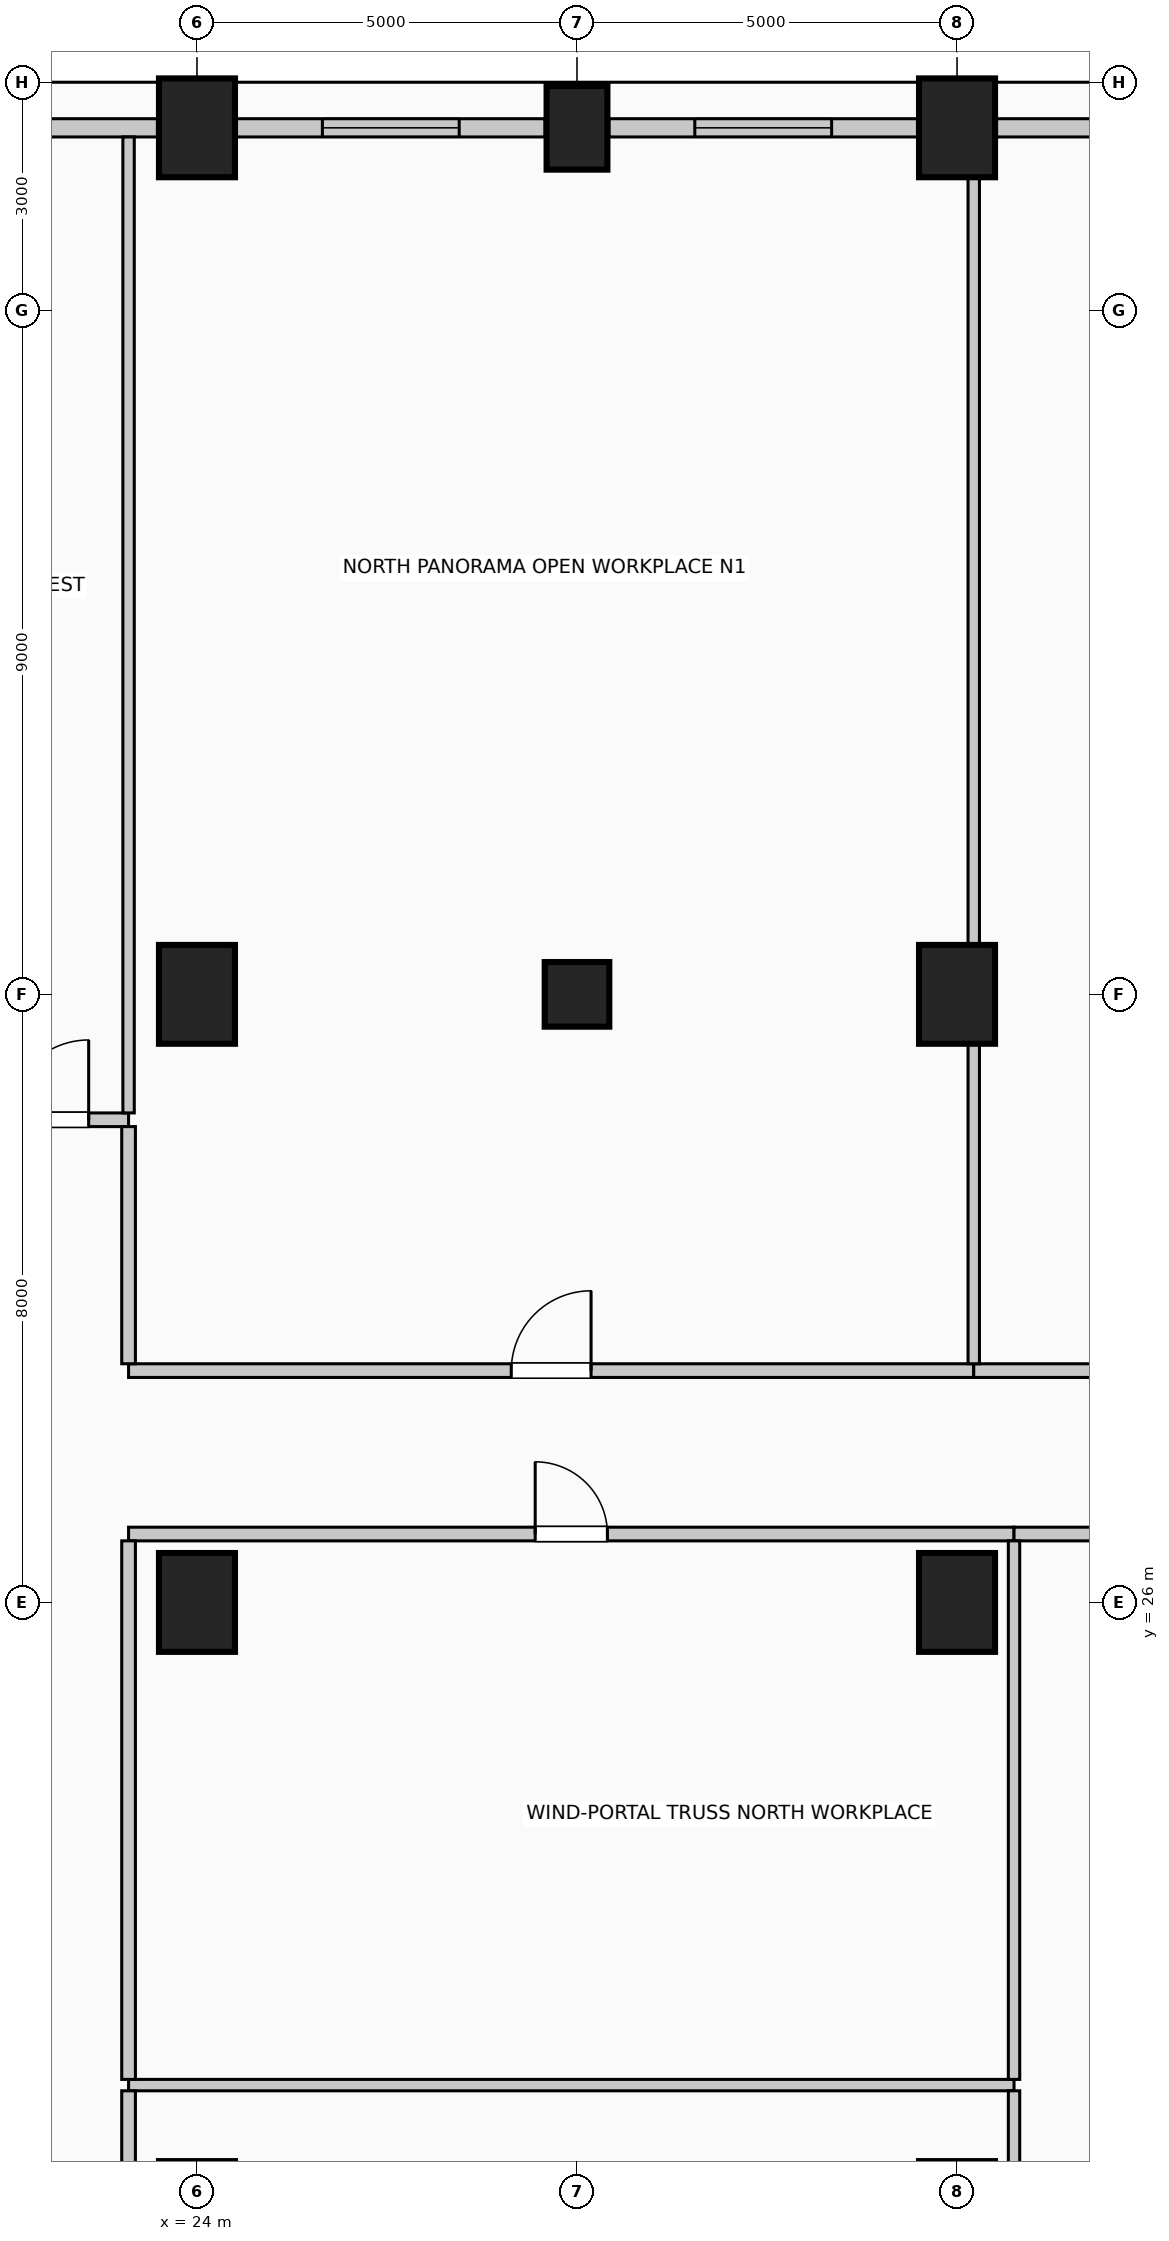
"""IFC4 building model, lengths in metres.
Left out: names, types, materials, properties, quantities, classifications, styles, units other than length and angle.
Written with IfcOpenShell. Run it as: python <this file> out.ifc"""

import sys

from ifc_helpers import new_model, si_unit, direction, frame, frame_2d, origin, origin_2d, place, context, subcontext, project, spatial, rectangle, circle, extrude, element, fill, save


model = new_model("IFC4")
c1 = context("Model", 3, precision=1e-05, world=origin(), true_north=direction((0.0, 1.0)))
c2 = subcontext(c1, "Body", "Model", "MODEL_VIEW")
j1 = project(units=[si_unit("LENGTHUNIT", "METRE"), si_unit("PLANEANGLEUNIT", "RADIAN")], contexts=[c1])
p1 = place(None, origin())
s1 = spatial("IfcSite", under=j1, at=p1, CompositionType="ELEMENT")
p2 = place(p1, origin())
s2 = spatial("IfcBuilding", under=s1, at=p2, CompositionType="ELEMENT")
p3 = place(p2, frame((0.0, 0.0, 206.6)))
s3 = spatial("IfcBuildingStorey", under=s2, at=p3, CompositionType="ELEMENT", Elevation=206.6)
p4 = place(p3, frame((24.0, 45.4, 0.0), z_axis=(0.0, 0.0, 1.0), x_axis=(1.0, 0.0, 0.0)))
e1 = element("IfcColumn", 1, at=p4, inside=s3, PredefinedType="COLUMN", context=c2, shape_type="SweptSolid", body=[
    extrude(rectangle(XDim=1.0, YDim=1.3, at=origin_2d()), origin(), (0.0, 0.0, 1.0), 4.0),
])
p5 = place(p3, frame((29.0, 45.4, 0.0), z_axis=(0.0, 0.0, 1.0), x_axis=(1.0, 0.0, 0.0)))
e2 = element("IfcColumn", 2, at=p5, inside=s3, PredefinedType="COLUMN", context=c2, shape_type="SweptSolid", body=[
    extrude(rectangle(XDim=0.8, YDim=1.1, at=origin_2d()), origin(), (0.0, 0.0, 1.0), 4.0),
])
for number, where, z_axis, x_axis in (
    (3, (34.0, 45.4, 0.0), (0.0, 0.0, 1.0), (1.0, 0.0, 0.0)),
    (4, (24.0, 18.0, 0.0), (0.0, 0.0, 1.0), (1.0, 0.0, 0.0)),
    (5, (34.0, 18.0, 0.0), (0.0, 0.0, 1.0), (1.0, 0.0, 0.0)),
    (6, (24.0, 26.0, 0.0), (0.0, 0.0, 1.0), (1.0, 0.0, 0.0)),
    (7, (34.0, 26.0, 0.0), (0.0, 0.0, 1.0), (1.0, 0.0, 0.0)),
    (8, (24.0, 34.0, 0.0), (0.0, 0.0, 1.0), (1.0, 0.0, 0.0)),
    (9, (34.0, 34.0, 0.0), (0.0, 0.0, 1.0), (1.0, 0.0, 0.0)),
):
    element("IfcColumn", number, at=place(p3, frame(where, z_axis=z_axis, x_axis=x_axis)), inside=s3, PredefinedType="COLUMN", context=c2, shape_type="SweptSolid", body=[
        extrude(rectangle(XDim=1.0, YDim=1.3, at=origin_2d()), origin(), (0.0, 0.0, 1.0), 4.0),
    ])
p6 = place(p3, frame((29.0, 34.0, 0.0), z_axis=(0.0, 0.0, 1.0), x_axis=(1.0, 0.0, 0.0)))
e10 = element("IfcColumn", 10, at=p6, inside=s3, PredefinedType="COLUMN", context=c2, shape_type="SweptSolid", body=[
    extrude(circle(Radius=0.425, at=origin_2d()), origin(), (0.0, 0.0, 1.0), 4.0),
])
p7 = place(p3, frame((16.92, 45.4, 0.0), z_axis=(0.0, 0.0, 1.0), x_axis=(1.0, 0.0, 0.0)))
e11 = element("IfcWall", 11, at=p7, inside=s3, PredefinedType="SOLIDWALL", context=c2, shape_type="SweptSolid", body=[
    extrude(rectangle(XDim=6.56, YDim=0.24, at=frame_2d((3.28, 0.0))), origin(), (0.0, 0.0, 1.0), 3.0),
])
p8 = place(p7, frame((0.987, 0.0, 0.42)))
e12 = element("IfcOpeningElement", 12, at=p8, cuts=e11, PredefinedType="OPENING", context=c2, shape_type="SweptSolid", body=[
    extrude(rectangle(XDim=1.8, YDim=2.2, at=frame_2d((0.9, 1.1))), frame((0.0, 0.13, 0.0), z_axis=(0.0, -1.0, 0.0), x_axis=(1.0, 0.0, 0.0)), (0.0, 0.0, 1.0), 0.26),
])
p9 = place(p3, frame((24.52, 45.4, 0.0), z_axis=(0.0, 0.0, 1.0), x_axis=(1.0, 0.0, 0.0)))
e13 = element("IfcWall", 13, at=p9, inside=s3, PredefinedType="SOLIDWALL", context=c2, shape_type="SweptSolid", body=[
    extrude(rectangle(XDim=4.06, YDim=0.24, at=frame_2d((2.03, 0.0))), origin(), (0.0, 0.0, 1.0), 3.0),
])
p10 = place(p9, frame((1.13, 0.0, 0.42)))
e14 = element("IfcOpeningElement", 14, at=p10, cuts=e13, PredefinedType="OPENING", context=c2, shape_type="SweptSolid", body=[
    extrude(rectangle(XDim=1.8, YDim=2.2, at=frame_2d((0.9, 1.1))), frame((0.0, 0.13, 0.0), z_axis=(0.0, -1.0, 0.0), x_axis=(1.0, 0.0, 0.0)), (0.0, 0.0, 1.0), 0.26),
])
p11 = place(p3, frame((29.42, 45.4, 0.0), z_axis=(0.0, 0.0, 1.0), x_axis=(1.0, 0.0, 0.0)))
e15 = element("IfcWall", 15, at=p11, inside=s3, PredefinedType="SOLIDWALL", context=c2, shape_type="SweptSolid", body=[
    extrude(rectangle(XDim=4.06, YDim=0.24, at=frame_2d((2.03, 0.0))), origin(), (0.0, 0.0, 1.0), 3.0),
])
p12 = place(p11, frame((1.13, 0.0, 0.42)))
e16 = element("IfcOpeningElement", 16, at=p12, cuts=e15, PredefinedType="OPENING", context=c2, shape_type="SweptSolid", body=[
    extrude(rectangle(XDim=1.8, YDim=2.2, at=frame_2d((0.9, 1.1))), frame((0.0, 0.13, 0.0), z_axis=(0.0, -1.0, 0.0), x_axis=(1.0, 0.0, 0.0)), (0.0, 0.0, 1.0), 0.26),
])
p13 = place(p3, frame((34.52, 45.4, 0.0), z_axis=(0.0, 0.0, 1.0), x_axis=(1.0, 0.0, 0.0)))
e17 = element("IfcWall", 17, at=p13, inside=s3, PredefinedType="SOLIDWALL", context=c2, shape_type="SweptSolid", body=[
    extrude(rectangle(XDim=6.56, YDim=0.24, at=frame_2d((3.28, 0.0))), origin(), (0.0, 0.0, 1.0), 3.0),
])
p14 = place(p13, frame((3.773, 0.0, 0.42)))
e18 = element("IfcOpeningElement", 18, at=p14, cuts=e17, PredefinedType="OPENING", context=c2, shape_type="SweptSolid", body=[
    extrude(rectangle(XDim=1.8, YDim=2.2, at=frame_2d((0.9, 1.1))), frame((0.0, 0.13, 0.0), z_axis=(0.0, -1.0, 0.0), x_axis=(1.0, 0.0, 0.0)), (0.0, 0.0, 1.0), 0.26),
])
p15 = place(p3, frame((23.1, 19.65, 0.0), z_axis=(0.0, 0.0, 1.0), x_axis=(1.0, 0.0, 0.0)))
e19 = element("IfcWall", 19, at=p15, inside=s3, PredefinedType="PARTITIONING", context=c2, shape_type="SweptSolid", body=[
    extrude(rectangle(XDim=11.65, YDim=0.15, at=frame_2d((5.825, 0.0))), origin(), (0.0, 0.0, 1.0), 3.75),
])
p16 = place(p3, frame((23.1, 26.9, 0.0), z_axis=(0.0, 0.0, 1.0), x_axis=(1.0, 0.0, 0.0)))
e20 = element("IfcWall", 20, at=p16, inside=s3, PredefinedType="PARTITIONING", context=c2, shape_type="SweptSolid", body=[
    extrude(rectangle(XDim=11.65, YDim=0.18, at=frame_2d((5.825, 0.0))), origin(), (0.0, 0.0, 1.0), 3.75),
])
p17 = place(p16, frame((5.35, 0.0, 0.0)))
e21 = element("IfcOpeningElement", 21, at=p17, cuts=e20, PredefinedType="OPENING", context=c2, shape_type="SweptSolid", body=[
    extrude(rectangle(XDim=0.95, YDim=2.15, at=frame_2d((0.475, 1.075))), frame((0.0, 0.1, 0.0), z_axis=(0.0, -1.0, 0.0), x_axis=(1.0, 0.0, 0.0)), (0.0, 0.0, 1.0), 0.2),
])
p18 = place(p3, frame((34.75, 26.9, 0.0), z_axis=(0.0, 0.0, 1.0), x_axis=(1.0, 0.0, 0.0)))
e22 = element("IfcWall", 22, at=p18, inside=s3, PredefinedType="PARTITIONING", context=c2, shape_type="SweptSolid", body=[
    extrude(rectangle(XDim=22.53, YDim=0.18, at=frame_2d((11.265, 0.0))), origin(), (0.0, 0.0, 1.0), 3.75),
])
p19 = place(p3, frame((23.1, 29.05, 0.0), z_axis=(0.0, 0.0, 1.0), x_axis=(1.0, 0.0, 0.0)))
e23 = element("IfcWall", 23, at=p19, inside=s3, PredefinedType="PARTITIONING", context=c2, shape_type="SweptSolid", body=[
    extrude(rectangle(XDim=11.12, YDim=0.18, at=frame_2d((5.56, 0.0))), origin(), (0.0, 0.0, 1.0), 3.75),
])
p20 = place(p19, frame((5.035, 0.0, 0.0)))
e24 = element("IfcOpeningElement", 24, at=p20, cuts=e23, PredefinedType="OPENING", context=c2, shape_type="SweptSolid", body=[
    extrude(rectangle(XDim=1.05, YDim=2.15, at=frame_2d((0.525, 1.075))), frame((0.0, 0.1, 0.0), z_axis=(0.0, -1.0, 0.0), x_axis=(1.0, 0.0, 0.0)), (0.0, 0.0, 1.0), 0.2),
])
p21 = place(p3, frame((34.22, 29.05, 0.0), z_axis=(0.0, 0.0, 1.0), x_axis=(1.0, 0.0, 0.0)))
e25 = element("IfcWall", 25, at=p21, inside=s3, PredefinedType="PARTITIONING", context=c2, shape_type="SweptSolid", body=[
    extrude(rectangle(XDim=7.33, YDim=0.18, at=frame_2d((3.665, 0.0))), origin(), (0.0, 0.0, 1.0), 3.75),
])
p22 = place(p21, frame((3.19, 0.0, 0.0)))
e26 = element("IfcOpeningElement", 26, at=p22, cuts=e25, PredefinedType="OPENING", context=c2, shape_type="SweptSolid", body=[
    extrude(rectangle(XDim=0.95, YDim=2.15, at=frame_2d((0.475, 1.075))), frame((0.0, 0.1, 0.0), z_axis=(0.0, -1.0, 0.0), x_axis=(1.0, 0.0, 0.0)), (0.0, 0.0, 1.0), 0.2),
])
p23 = place(p3, frame((21.0, 32.35, 0.0), z_axis=(0.0, 0.0, 1.0), x_axis=(1.0, 0.0, 0.0)))
e27 = element("IfcWall", 27, at=p23, inside=s3, PredefinedType="PARTITIONING", context=c2, shape_type="SweptSolid", body=[
    extrude(rectangle(XDim=2.1, YDim=0.18, at=frame_2d((1.05, 0.0))), origin(), (0.0, 0.0, 1.0), 3.75),
])
p24 = place(p23, frame((0.525, 0.0, 0.0)))
e28 = element("IfcOpeningElement", 28, at=p24, cuts=e27, PredefinedType="OPENING", context=c2, shape_type="SweptSolid", body=[
    extrude(rectangle(XDim=1.05, YDim=2.15, at=frame_2d((0.525, 1.075))), frame((0.0, 0.1, 0.0), z_axis=(0.0, -1.0, 0.0), x_axis=(1.0, 0.0, 0.0)), (0.0, 0.0, 1.0), 0.2),
])
p25 = place(p3, frame((23.1, 16.39, 0.0), z_axis=(0.0, 0.0, 1.0), x_axis=(0.0, 1.0, 0.0)))
e29 = element("IfcWall", 29, at=p25, inside=s3, PredefinedType="PARTITIONING", context=c2, shape_type="SweptSolid", body=[
    extrude(rectangle(XDim=3.185, YDim=0.18, at=frame_2d((1.593, 0.0))), origin(), (0.0, 0.0, 1.0), 3.75),
])
p26 = place(p3, frame((23.1, 19.725, 0.0), z_axis=(0.0, 0.0, 1.0), x_axis=(0.0, 1.0, 0.0)))
e30 = element("IfcWall", 30, at=p26, inside=s3, PredefinedType="PARTITIONING", context=c2, shape_type="SweptSolid", body=[
    extrude(rectangle(XDim=7.085, YDim=0.18, at=frame_2d((3.542, 0.0))), origin(), (0.0, 0.0, 1.0), 3.75),
])
p27 = place(p3, frame((23.1, 29.14, 0.0), z_axis=(0.0, 0.0, 1.0), x_axis=(0.0, 1.0, 0.0)))
e31 = element("IfcWall", 31, at=p27, inside=s3, PredefinedType="PARTITIONING", context=c2, shape_type="SweptSolid", body=[
    extrude(rectangle(XDim=3.12, YDim=0.18, at=frame_2d((1.56, 0.0))), origin(), (0.0, 0.0, 1.0), 3.75),
])
p28 = place(p3, frame((23.1, 32.44, 0.0), z_axis=(0.0, 0.0, 1.0), x_axis=(0.0, 1.0, 0.0)))
e32 = element("IfcWall", 32, at=p28, inside=s3, PredefinedType="PARTITIONING", context=c2, shape_type="SweptSolid", body=[
    extrude(rectangle(XDim=12.84, YDim=0.15, at=frame_2d((6.42, 0.0))), origin(), (0.0, 0.0, 1.0), 3.75),
])
p29 = place(p3, frame((34.22, 29.14, 0.0), z_axis=(0.0, 0.0, 1.0), x_axis=(0.0, 1.0, 0.0)))
e33 = element("IfcWall", 33, at=p29, inside=s3, PredefinedType="PARTITIONING", context=c2, shape_type="SweptSolid", body=[
    extrude(rectangle(XDim=4.21, YDim=0.15, at=frame_2d((2.105, 0.0))), origin(), (0.0, 0.0, 1.0), 3.145),
])
p30 = place(p3, frame((34.22, 34.65, 0.0), z_axis=(0.0, 0.0, 1.0), x_axis=(0.0, 1.0, 0.0)))
e34 = element("IfcWall", 34, at=p30, inside=s3, PredefinedType="PARTITIONING", context=c2, shape_type="SweptSolid", body=[
    extrude(rectangle(XDim=10.1, YDim=0.15, at=frame_2d((5.05, 0.0))), origin(), (0.0, 0.0, 1.0), 3.145),
])
p31 = place(p3, frame((34.75, 16.39, 0.0), z_axis=(0.0, 0.0, 1.0), x_axis=(0.0, 1.0, 0.0)))
e35 = element("IfcWall", 35, at=p31, inside=s3, PredefinedType="PARTITIONING", context=c2, shape_type="SweptSolid", body=[
    extrude(rectangle(XDim=3.185, YDim=0.15, at=frame_2d((1.593, 0.0))), origin(), (0.0, 0.0, 1.0), 3.75),
])
p32 = place(p3, frame((34.75, 19.725, 0.0), z_axis=(0.0, 0.0, 1.0), x_axis=(0.0, 1.0, 0.0)))
e36 = element("IfcWall", 36, at=p32, inside=s3, PredefinedType="PARTITIONING", context=c2, shape_type="SweptSolid", body=[
    extrude(rectangle(XDim=7.085, YDim=0.15, at=frame_2d((3.542, 0.0))), origin(), (0.0, 0.0, 1.0), 3.75),
])
p33 = place(p10, origin())
e37 = element("IfcWindow", 37, at=p33, inside=s3, PartitioningType="SINGLE_PANEL", PredefinedType="WINDOW", context=c2, shape_type="SweptSolid", body=[
    extrude(rectangle(XDim=1.8, YDim=2.2, at=frame_2d((0.9, 1.1))), frame((0.0, 0.03, 0.0), z_axis=(0.0, -1.0, 0.0), x_axis=(1.0, 0.0, 0.0)), (0.0, 0.0, 1.0), 0.06),
])
fill(e14, e37)
p34 = place(p12, origin())
e38 = element("IfcWindow", 38, at=p34, inside=s3, PartitioningType="SINGLE_PANEL", PredefinedType="WINDOW", context=c2, shape_type="SweptSolid", body=[
    extrude(rectangle(XDim=1.8, YDim=2.2, at=frame_2d((0.9, 1.1))), frame((0.0, 0.03, 0.0), z_axis=(0.0, -1.0, 0.0), x_axis=(1.0, 0.0, 0.0)), (0.0, 0.0, 1.0), 0.06),
])
fill(e16, e38)
p35 = place(p17, origin())
e39 = element("IfcDoor", 39, at=p35, inside=s3, OperationType="SINGLE_SWING_LEFT", PredefinedType="DOOR", context=c2, shape_type="SweptSolid", body=[
    extrude(rectangle(XDim=0.95, YDim=2.15, at=frame_2d((0.475, 1.075))), frame((0.0, 0.025, 0.0), z_axis=(0.0, -1.0, 0.0), x_axis=(1.0, 0.0, 0.0)), (0.0, 0.0, 1.0), 0.05),
])
fill(e21, e39)
p36 = place(p20, origin())
e40 = element("IfcDoor", 40, at=p36, inside=s3, OperationType="SINGLE_SWING_RIGHT", PredefinedType="DOOR", context=c2, shape_type="SweptSolid", body=[
    extrude(rectangle(XDim=1.05, YDim=2.15, at=frame_2d((0.525, 1.075))), frame((0.0, 0.025, 0.0), z_axis=(0.0, -1.0, 0.0), x_axis=(1.0, 0.0, 0.0)), (0.0, 0.0, 1.0), 0.05),
])
fill(e24, e40)
p37 = place(p24, origin())
e41 = element("IfcDoor", 41, at=p37, inside=s3, OperationType="SINGLE_SWING_RIGHT", PredefinedType="DOOR", context=c2, shape_type="SweptSolid", body=[
    extrude(rectangle(XDim=1.05, YDim=2.15, at=frame_2d((0.525, 1.075))), frame((0.0, 0.025, 0.0), z_axis=(0.0, -1.0, 0.0), x_axis=(1.0, 0.0, 0.0)), (0.0, 0.0, 1.0), 0.05),
])
fill(e28, e41)
save(model, sys.argv[1])
